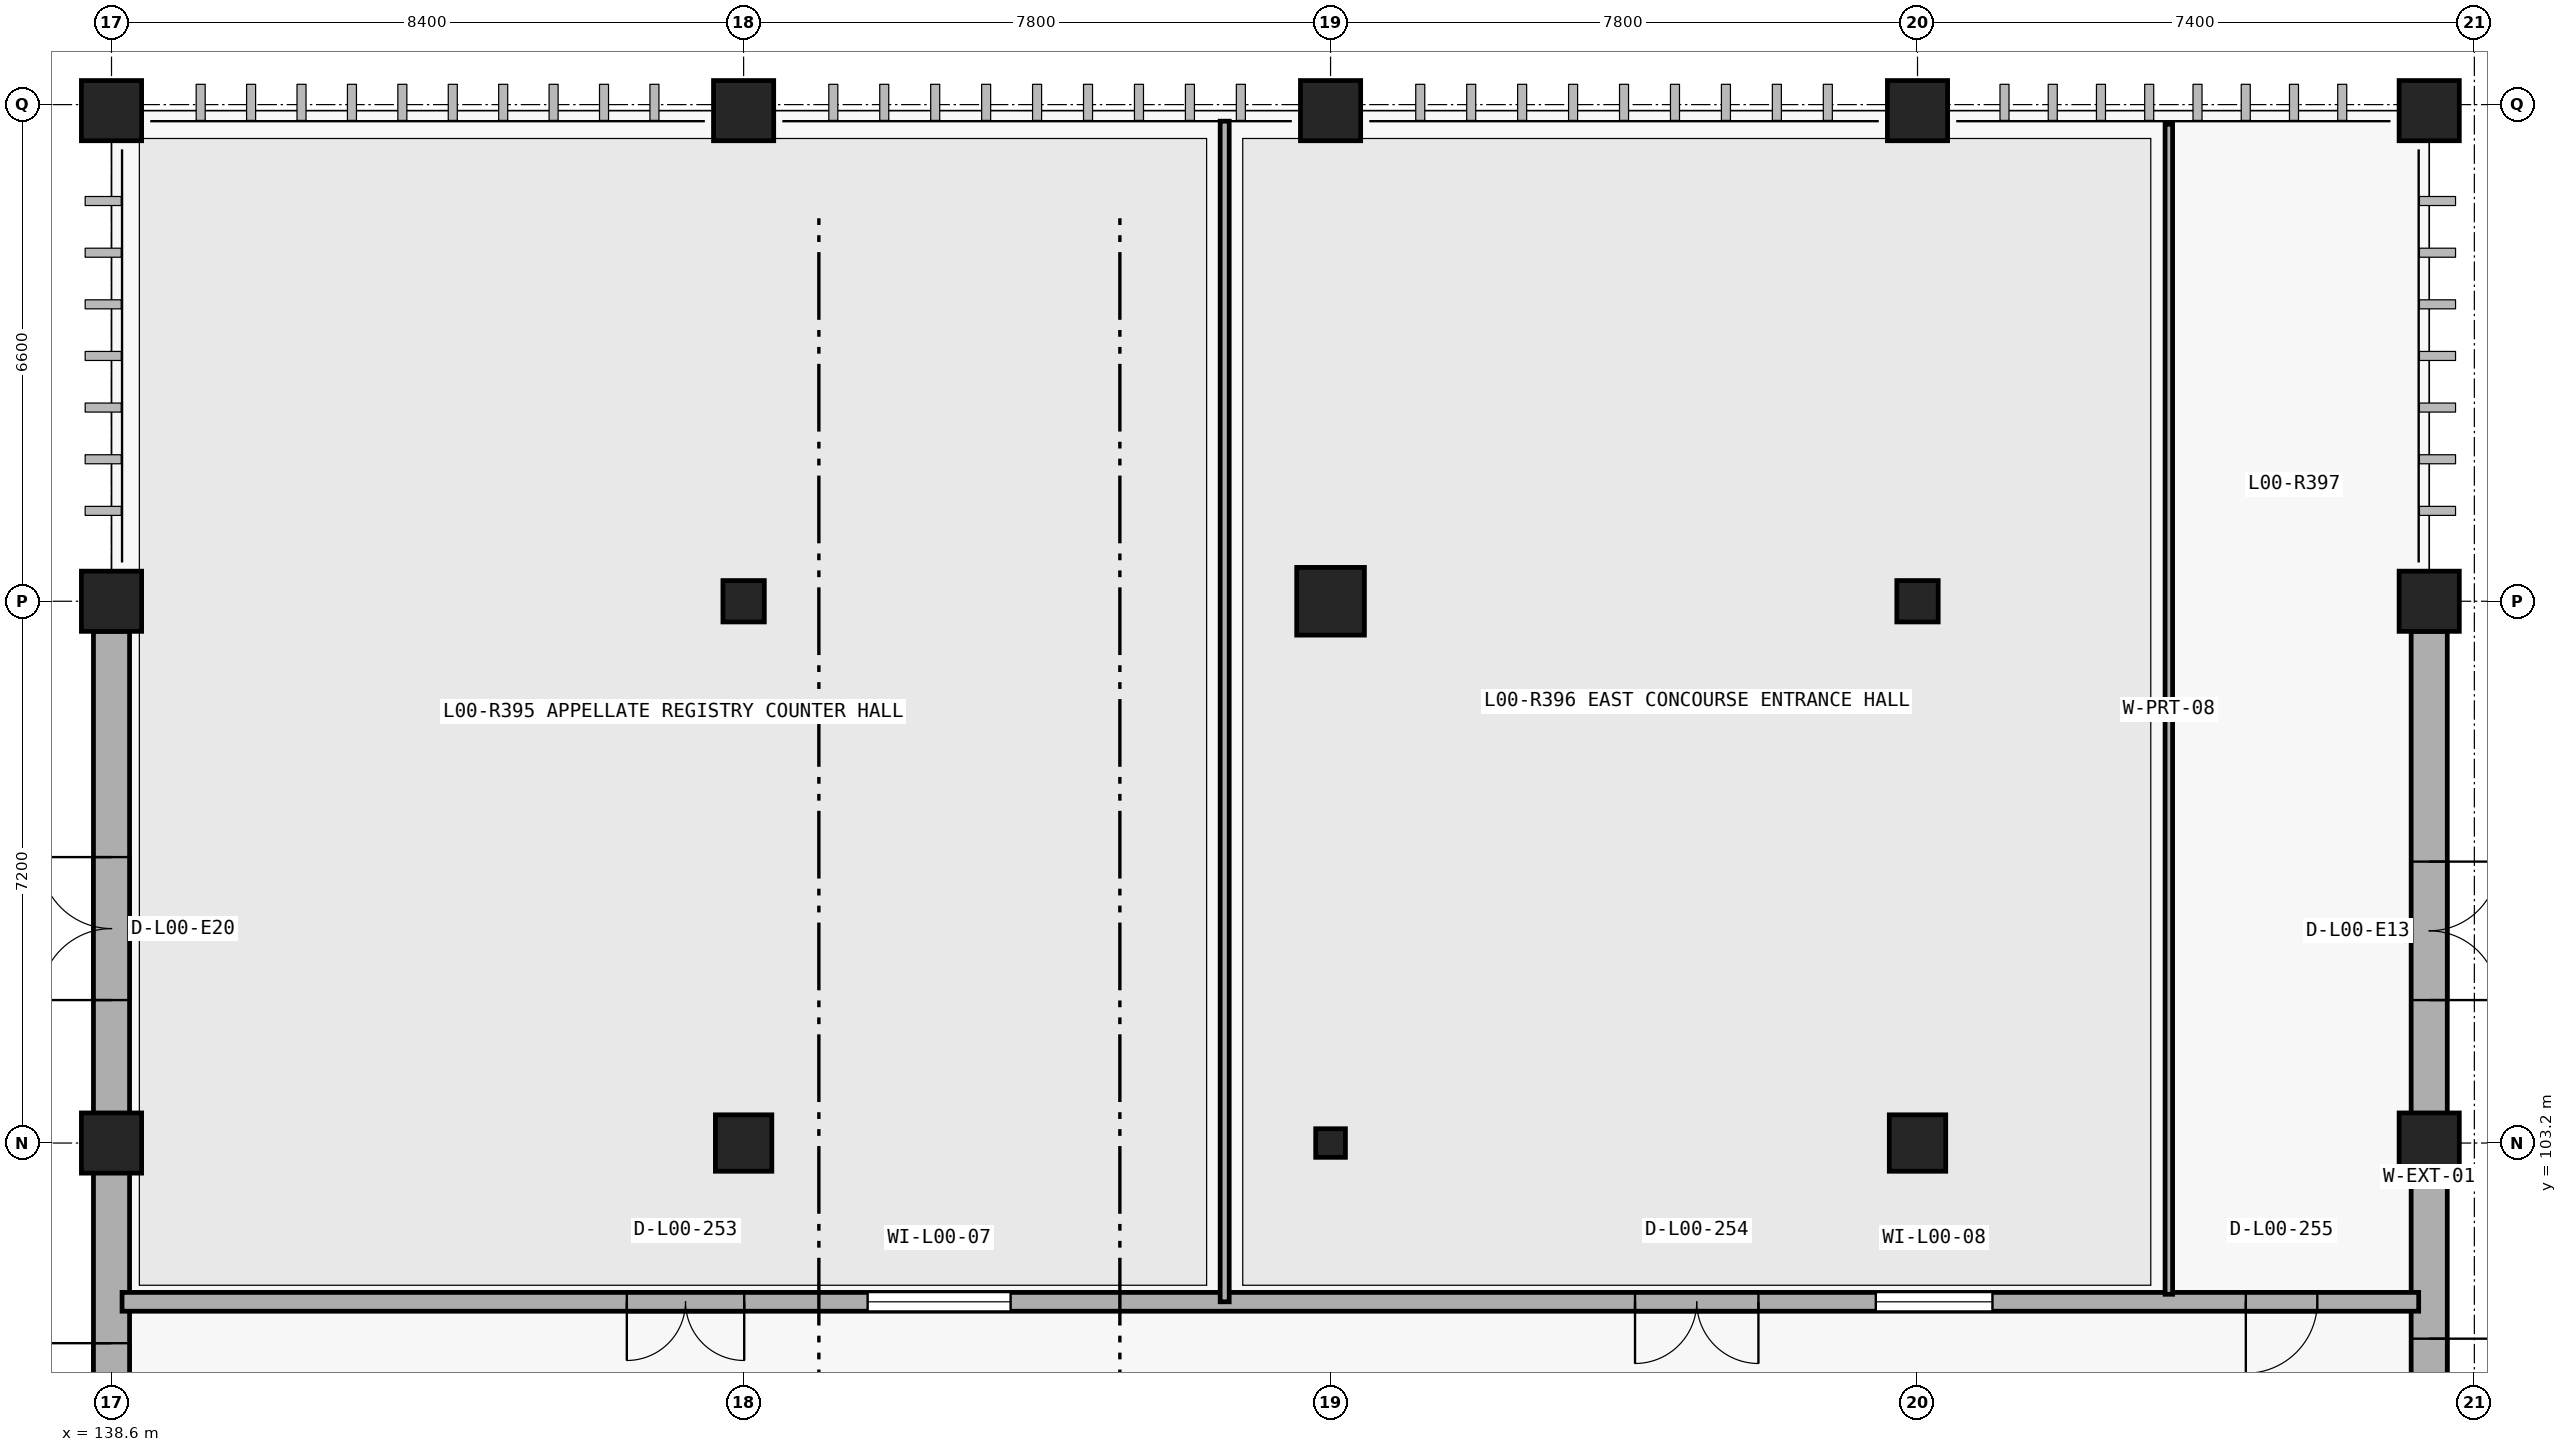
"""IFC4 building model, lengths in metres.
Left out: names, types, materials, properties, quantities, classifications, styles, units other than length and angle.
Written with IfcOpenShell. Run it as: python <this file> out.ifc"""

import sys

from ifc_helpers import new_model, si_unit, direction, frame, frame_2d, origin_with_axes, origin_2d_with_axis, place, context, subcontext, project, spatial, rectangle, circle, i_section, extrude, element, fill, save


model = new_model("IFC4")
c1 = context("Model", 3, precision=1e-05, world=origin_with_axes(), true_north=direction((0.0, 1.0)))
c2 = subcontext(c1, "Body", "Model", "MODEL_VIEW")
j1 = project(units=[si_unit("LENGTHUNIT", "METRE"), si_unit("PLANEANGLEUNIT", "RADIAN")], contexts=[c1])
p1 = place(None, origin_with_axes())
s1 = spatial("IfcSite", under=j1, at=p1, CompositionType="ELEMENT")
p2 = place(p1, origin_with_axes())
s2 = spatial("IfcBuilding", under=s1, at=p2, CompositionType="ELEMENT")
p3 = place(p2, origin_with_axes())
s3 = spatial("IfcBuildingStorey", under=s2, at=p3, CompositionType="ELEMENT", Elevation=0.0)
p4 = place(None, frame((169.4, 95.5, 0.0), z_axis=(0.0, 0.0, 1.0), x_axis=(0.0, 1.0, 0.0)))
e1 = element("IfcWall", 1, at=p4, inside=s3, PredefinedType="SOLIDWALL", context=c2, shape_type="SweptSolid", body=[
    extrude(rectangle(XDim=14.5, YDim=0.48, at=frame_2d((7.25, 0.0), x_axis=(1.0, 0.0))), origin_with_axes(), (0.0, 0.0, 1.0), 4.684),
])
p5 = place(None, frame((169.4, 99.65, 0.0), z_axis=(0.0, 0.0, 1.0), x_axis=(0.0, 1.0, 0.0)))
e2 = element("IfcOpeningElement", 2, at=p5, cuts=e1, PredefinedType="OPENING", context=c2, shape_type="SweptSolid", body=[
    extrude(rectangle(XDim=1.9, YDim=2.4, at=frame_2d((0.0, 1.2), x_axis=(1.0, 0.0))), frame((0.0, 0.25, 0.0), z_axis=(0.0, -1.0, 0.0), x_axis=(1.0, 0.0, 0.0)), (0.0, 0.0, 1.0), 0.5),
])
p6 = place(None, frame((169.4, 106.02, 0.0), z_axis=(0.0, 0.0, 1.0), x_axis=(0.0, 1.0, 0.0)))
e3 = element("IfcOpeningElement", 3, at=p6, cuts=e1, PredefinedType="OPENING", context=c2, shape_type="SweptSolid", body=[
    extrude(rectangle(XDim=1.84, YDim=2.34, at=frame_2d((0.0, 1.17), x_axis=(1.0, 0.0))), frame((0.0, 0.25, 0.0), z_axis=(0.0, -1.0, 0.0), x_axis=(1.0, 0.0, 0.0)), (0.0, 0.0, 1.0), 0.5),
])
p7 = place(None, frame((138.6, 95.5, 0.0), z_axis=(0.0, 0.0, 1.0), x_axis=(0.0, 1.0, 0.0)))
e4 = element("IfcWall", 4, at=p7, inside=s3, PredefinedType="SOLIDWALL", context=c2, shape_type="SweptSolid", body=[
    extrude(rectangle(XDim=14.5, YDim=0.48, at=frame_2d((7.25, 0.0), x_axis=(1.0, 0.0))), origin_with_axes(), (0.0, 0.0, 1.0), 4.684),
])
p8 = place(None, frame((138.6, 99.62, 0.0), z_axis=(0.0, 0.0, 1.0), x_axis=(0.0, 1.0, 0.0)))
e5 = element("IfcOpeningElement", 5, at=p8, cuts=e4, PredefinedType="OPENING", context=c2, shape_type="SweptSolid", body=[
    extrude(rectangle(XDim=1.84, YDim=2.34, at=frame_2d((0.0, 1.17), x_axis=(1.0, 0.0))), frame((0.0, 0.25, 0.0), z_axis=(0.0, -1.0, 0.0), x_axis=(1.0, 0.0, 0.0)), (0.0, 0.0, 1.0), 0.5),
])
p9 = place(None, frame((138.6, 106.05, 0.0), z_axis=(0.0, 0.0, 1.0), x_axis=(0.0, 1.0, 0.0)))
e6 = element("IfcOpeningElement", 6, at=p9, cuts=e4, PredefinedType="OPENING", context=c2, shape_type="SweptSolid", body=[
    extrude(rectangle(XDim=1.9, YDim=2.4, at=frame_2d((0.0, 1.2), x_axis=(1.0, 0.0))), frame((0.0, 0.25, 0.0), z_axis=(0.0, -1.0, 0.0), x_axis=(1.0, 0.0, 0.0)), (0.0, 0.0, 1.0), 0.5),
])
p10 = place(None, frame((138.74, 101.09, 0.0), z_axis=(0.0, 0.0, 1.0), x_axis=(1.0, 0.0, 0.0)))
e7 = element("IfcWall", 7, at=p10, inside=s3, PredefinedType="PARTITIONING", context=c2, shape_type="SweptSolid", body=[
    extrude(rectangle(XDim=30.52, YDim=0.25, at=frame_2d((15.26, 0.0), x_axis=(1.0, 0.0))), origin_with_axes(), (0.0, 0.0, 1.0), 5.08),
])
p11 = place(None, frame((146.228, 101.09, 0.0), z_axis=(0.0, 0.0, 1.0), x_axis=(1.0, 0.0, 0.0)))
e8 = element("IfcOpeningElement", 8, at=p11, cuts=e7, PredefinedType="OPENING", context=c2, shape_type="SweptSolid", body=[
    extrude(rectangle(XDim=1.56, YDim=2.28, at=frame_2d((0.0, 1.14), x_axis=(1.0, 0.0))), frame((0.0, 0.135, 0.0), z_axis=(0.0, -1.0, 0.0), x_axis=(1.0, 0.0, 0.0)), (0.0, 0.0, 1.0), 0.27),
])
p12 = place(None, frame((159.666, 101.09, 0.0), z_axis=(0.0, 0.0, 1.0), x_axis=(1.0, 0.0, 0.0)))
e9 = element("IfcOpeningElement", 9, at=p12, cuts=e7, PredefinedType="OPENING", context=c2, shape_type="SweptSolid", body=[
    extrude(rectangle(XDim=1.64, YDim=2.42, at=frame_2d((0.0, 1.21), x_axis=(1.0, 0.0))), frame((0.0, 0.135, 0.0), z_axis=(0.0, -1.0, 0.0), x_axis=(1.0, 0.0, 0.0)), (0.0, 0.0, 1.0), 0.27),
])
p13 = place(None, frame((167.438, 101.09, 0.0), z_axis=(0.0, 0.0, 1.0), x_axis=(1.0, 0.0, 0.0)))
e10 = element("IfcOpeningElement", 10, at=p13, cuts=e7, PredefinedType="OPENING", context=c2, shape_type="SweptSolid", body=[
    extrude(rectangle(XDim=0.95, YDim=2.1, at=frame_2d((0.0, 1.05), x_axis=(1.0, 0.0))), frame((0.0, 0.135, 0.0), z_axis=(0.0, -1.0, 0.0), x_axis=(1.0, 0.0, 0.0)), (0.0, 0.0, 1.0), 0.27),
])
p14 = place(None, frame((149.598, 101.09, 1.05), z_axis=(0.0, 0.0, 1.0), x_axis=(1.0, 0.0, 0.0)))
e11 = element("IfcOpeningElement", 11, at=p14, cuts=e7, PredefinedType="OPENING", context=c2, shape_type="SweptSolid", body=[
    extrude(rectangle(XDim=1.9, YDim=1.5, at=frame_2d((0.0, 0.75), x_axis=(1.0, 0.0))), frame((0.0, 0.135, 0.0), z_axis=(0.0, -1.0, 0.0), x_axis=(1.0, 0.0, 0.0)), (0.0, 0.0, 1.0), 0.27),
])
p15 = place(None, frame((162.821, 101.09, 1.05), z_axis=(0.0, 0.0, 1.0), x_axis=(1.0, 0.0, 0.0)))
e12 = element("IfcOpeningElement", 12, at=p15, cuts=e7, PredefinedType="OPENING", context=c2, shape_type="SweptSolid", body=[
    extrude(rectangle(XDim=1.55, YDim=1.35, at=frame_2d((0.0, 0.675), x_axis=(1.0, 0.0))), frame((0.0, 0.135, 0.0), z_axis=(0.0, -1.0, 0.0), x_axis=(1.0, 0.0, 0.0)), (0.0, 0.0, 1.0), 0.27),
])
p16 = place(None, frame((165.94, 101.19, 0.0), z_axis=(0.0, 0.0, 1.0), x_axis=(0.0, 1.0, 0.0)))
e13 = element("IfcWall", 13, at=p16, inside=s3, PredefinedType="PARTITIONING", context=c2, shape_type="SweptSolid", body=[
    extrude(rectangle(XDim=15.55, YDim=0.1, at=frame_2d((7.775, 0.0), x_axis=(1.0, 0.0))), origin_with_axes(), (0.0, 0.0, 1.0), 5.08),
])
p17 = place(None, frame((153.393, 101.09, 0.0), z_axis=(0.0, 0.0, 1.0), x_axis=(0.0, 1.0, 0.0)))
e14 = element("IfcWall", 14, at=p17, inside=s3, PredefinedType="PARTITIONING", context=c2, shape_type="SweptSolid", body=[
    extrude(rectangle(XDim=15.69, YDim=0.12, at=frame_2d((7.845, 0.0), x_axis=(1.0, 0.0))), origin_with_axes(), (0.0, 0.0, 1.0), 5.08),
])
for number, where, z_axis, x_axis in (
    (15, (138.6, 103.2, 0.0), (0.0, 0.0, 1.0), (1.0, 0.0, 0.0)),
    (16, (138.6, 110.4, 0.0), (0.0, 0.0, 1.0), (1.0, 0.0, 0.0)),
    (17, (138.6, 116.92, 0.0), (0.0, 0.0, 1.0), (1.0, 0.0, 0.0)),
):
    element("IfcColumn", number, at=place(None, frame(where, z_axis=z_axis, x_axis=x_axis)), inside=s3, PredefinedType="COLUMN", context=c2, shape_type="SweptSolid", body=[
        extrude(circle(Radius=0.4, at=origin_2d_with_axis()), origin_with_axes(), (0.0, 0.0, 1.0), 5.4),
    ])
p18 = place(None, frame((147.0, 103.2, 0.0), z_axis=(0.0, 0.0, 1.0), x_axis=(1.0, 0.0, 0.0)))
e18 = element("IfcColumn", 18, at=p18, inside=s3, PredefinedType="COLUMN", context=c2, shape_type="SweptSolid", body=[
    extrude(rectangle(XDim=0.75, YDim=0.75, at=origin_2d_with_axis()), origin_with_axes(), (0.0, 0.0, 1.0), 5.4),
])
p19 = place(None, frame((147.0, 110.4, 0.0), z_axis=(0.0, 0.0, 1.0), x_axis=(1.0, 0.0, 0.0)))
e19 = element("IfcColumn", 19, at=p19, inside=s3, PredefinedType="COLUMN", context=c2, shape_type="SweptSolid", body=[
    extrude(i_section(OverallWidth=0.55, OverallDepth=0.55, WebThickness=0.025, FlangeThickness=0.042, at=origin_2d_with_axis()), origin_with_axes(), (0.0, 0.0, 1.0), 5.4),
])
p20 = place(None, frame((147.0, 116.92, 0.0), z_axis=(0.0, 0.0, 1.0), x_axis=(1.0, 0.0, 0.0)))
e20 = element("IfcColumn", 20, at=p20, inside=s3, PredefinedType="COLUMN", context=c2, shape_type="SweptSolid", body=[
    extrude(circle(Radius=0.4, at=origin_2d_with_axis()), origin_with_axes(), (0.0, 0.0, 1.0), 5.4),
])
p21 = place(None, frame((154.8, 103.2, 0.0), z_axis=(0.0, 0.0, 1.0), x_axis=(1.0, 0.0, 0.0)))
e21 = element("IfcColumn", 21, at=p21, inside=s3, PredefinedType="COLUMN", context=c2, shape_type="SweptSolid", body=[
    extrude(i_section(OverallWidth=0.395, OverallDepth=0.38, WebThickness=0.019, FlangeThickness=0.03, at=origin_2d_with_axis()), origin_with_axes(), (0.0, 0.0, 1.0), 5.4),
])
p22 = place(None, frame((154.8, 110.4, 0.0), z_axis=(0.0, 0.0, 1.0), x_axis=(1.0, 0.0, 0.0)))
e22 = element("IfcColumn", 22, at=p22, inside=s3, PredefinedType="COLUMN", context=c2, shape_type="SweptSolid", body=[
    extrude(rectangle(XDim=0.9, YDim=0.9, at=origin_2d_with_axis()), origin_with_axes(), (0.0, 0.0, 1.0), 5.4),
])
p23 = place(None, frame((154.8, 116.92, 0.0), z_axis=(0.0, 0.0, 1.0), x_axis=(1.0, 0.0, 0.0)))
e23 = element("IfcColumn", 23, at=p23, inside=s3, PredefinedType="COLUMN", context=c2, shape_type="SweptSolid", body=[
    extrude(circle(Radius=0.4, at=origin_2d_with_axis()), origin_with_axes(), (0.0, 0.0, 1.0), 5.4),
])
p24 = place(None, frame((162.6, 103.2, 0.0), z_axis=(0.0, 0.0, 1.0), x_axis=(1.0, 0.0, 0.0)))
e24 = element("IfcColumn", 24, at=p24, inside=s3, PredefinedType="COLUMN", context=c2, shape_type="SweptSolid", body=[
    extrude(rectangle(XDim=0.75, YDim=0.75, at=origin_2d_with_axis()), origin_with_axes(), (0.0, 0.0, 1.0), 5.4),
])
p25 = place(None, frame((162.6, 110.4, 0.0), z_axis=(0.0, 0.0, 1.0), x_axis=(1.0, 0.0, 0.0)))
e25 = element("IfcColumn", 25, at=p25, inside=s3, PredefinedType="COLUMN", context=c2, shape_type="SweptSolid", body=[
    extrude(i_section(OverallWidth=0.55, OverallDepth=0.55, WebThickness=0.025, FlangeThickness=0.042, at=origin_2d_with_axis()), origin_with_axes(), (0.0, 0.0, 1.0), 5.4),
])
for number, where, z_axis, x_axis in (
    (26, (162.6, 116.92, 0.0), (0.0, 0.0, 1.0), (1.0, 0.0, 0.0)),
    (27, (169.4, 103.2, 0.0), (0.0, 0.0, 1.0), (1.0, 0.0, 0.0)),
    (28, (169.4, 110.4, 0.0), (0.0, 0.0, 1.0), (1.0, 0.0, 0.0)),
    (29, (169.4, 116.92, 0.0), (0.0, 0.0, 1.0), (1.0, 0.0, 0.0)),
):
    element("IfcColumn", number, at=place(None, frame(where, z_axis=z_axis, x_axis=x_axis)), inside=s3, PredefinedType="COLUMN", context=c2, shape_type="SweptSolid", body=[
        extrude(circle(Radius=0.4, at=origin_2d_with_axis()), origin_with_axes(), (0.0, 0.0, 1.0), 5.4),
    ])
p26 = place(None, frame((169.4, 99.65, 0.0), z_axis=(0.0, 0.0, 1.0), x_axis=(0.0, -1.0, 0.0)))
e30 = element("IfcDoor", 30, at=p26, inside=s3, OperationType="DOUBLE_DOOR_SINGLE_SWING", PredefinedType="DOOR", context=c2, shape_type="SweptSolid", body=[
    extrude(rectangle(XDim=1.9, YDim=2.4, at=frame_2d((0.0, 1.2), x_axis=(1.0, 0.0))), frame((0.0, 0.04, 0.0), z_axis=(0.0, -1.0, 0.0), x_axis=(1.0, 0.0, 0.0)), (0.0, 0.0, 1.0), 0.08),
])
fill(e2, e30)
p27 = place(None, frame((169.4, 106.02, 0.0), z_axis=(0.0, 0.0, 1.0), x_axis=(0.0, -1.0, 0.0)))
e31 = element("IfcDoor", 31, at=p27, inside=s3, OperationType="DOUBLE_DOOR_SINGLE_SWING", PredefinedType="DOOR", context=c2, shape_type="SweptSolid", body=[
    extrude(rectangle(XDim=1.84, YDim=2.34, at=frame_2d((0.0, 1.17), x_axis=(1.0, 0.0))), frame((0.0, 0.04, 0.0), z_axis=(0.0, -1.0, 0.0), x_axis=(1.0, 0.0, 0.0)), (0.0, 0.0, 1.0), 0.08),
])
fill(e3, e31)
p28 = place(None, frame((138.6, 99.62, 0.0), z_axis=(0.0, 0.0, 1.0), x_axis=(0.0, 1.0, 0.0)))
e32 = element("IfcDoor", 32, at=p28, inside=s3, OperationType="DOUBLE_DOOR_SINGLE_SWING", PredefinedType="DOOR", context=c2, shape_type="SweptSolid", body=[
    extrude(rectangle(XDim=1.84, YDim=2.34, at=frame_2d((0.0, 1.17), x_axis=(1.0, 0.0))), frame((0.0, 0.04, 0.0), z_axis=(0.0, -1.0, 0.0), x_axis=(1.0, 0.0, 0.0)), (0.0, 0.0, 1.0), 0.08),
])
fill(e5, e32)
p29 = place(None, frame((138.6, 106.05, 0.0), z_axis=(0.0, 0.0, 1.0), x_axis=(0.0, 1.0, 0.0)))
e33 = element("IfcDoor", 33, at=p29, inside=s3, OperationType="DOUBLE_DOOR_SINGLE_SWING", PredefinedType="DOOR", context=c2, shape_type="SweptSolid", body=[
    extrude(rectangle(XDim=1.9, YDim=2.4, at=frame_2d((0.0, 1.2), x_axis=(1.0, 0.0))), frame((0.0, 0.04, 0.0), z_axis=(0.0, -1.0, 0.0), x_axis=(1.0, 0.0, 0.0)), (0.0, 0.0, 1.0), 0.08),
])
fill(e6, e33)
p30 = place(None, frame((146.228, 101.09, 0.0), z_axis=(0.0, 0.0, 1.0), x_axis=(-1.0, 0.0, 0.0)))
e34 = element("IfcDoor", 34, at=p30, inside=s3, OperationType="DOUBLE_DOOR_SINGLE_SWING", PredefinedType="DOOR", context=c2, shape_type="SweptSolid", body=[
    extrude(rectangle(XDim=1.56, YDim=2.28, at=frame_2d((0.0, 1.14), x_axis=(1.0, 0.0))), frame((0.0, 0.04, 0.0), z_axis=(0.0, -1.0, 0.0), x_axis=(1.0, 0.0, 0.0)), (0.0, 0.0, 1.0), 0.08),
])
fill(e8, e34)
p31 = place(None, frame((159.666, 101.09, 0.0), z_axis=(0.0, 0.0, 1.0), x_axis=(-1.0, 0.0, 0.0)))
e35 = element("IfcDoor", 35, at=p31, inside=s3, OperationType="DOUBLE_DOOR_SINGLE_SWING", PredefinedType="DOOR", context=c2, shape_type="SweptSolid", body=[
    extrude(rectangle(XDim=1.64, YDim=2.42, at=frame_2d((0.0, 1.21), x_axis=(1.0, 0.0))), frame((0.0, 0.04, 0.0), z_axis=(0.0, -1.0, 0.0), x_axis=(1.0, 0.0, 0.0)), (0.0, 0.0, 1.0), 0.08),
])
fill(e9, e35)
p32 = place(None, frame((167.438, 101.09, 0.0), z_axis=(0.0, 0.0, 1.0), x_axis=(-1.0, 0.0, 0.0)))
e36 = element("IfcDoor", 36, at=p32, inside=s3, OperationType="SINGLE_SWING_LEFT", PredefinedType="DOOR", context=c2, shape_type="SweptSolid", body=[
    extrude(rectangle(XDim=0.95, YDim=2.1, at=frame_2d((0.0, 1.05), x_axis=(1.0, 0.0))), frame((0.0, 0.04, 0.0), z_axis=(0.0, -1.0, 0.0), x_axis=(1.0, 0.0, 0.0)), (0.0, 0.0, 1.0), 0.08),
])
fill(e10, e36)
p33 = place(None, frame((149.598, 101.09, 1.05), z_axis=(0.0, 0.0, 1.0), x_axis=(1.0, 0.0, 0.0)))
e37 = element("IfcWindow", 37, at=p33, inside=s3, PartitioningType="SINGLE_PANEL", PredefinedType="WINDOW", context=c2, shape_type="SweptSolid", body=[
    extrude(rectangle(XDim=1.9, YDim=1.5, at=frame_2d((0.0, 0.75), x_axis=(1.0, 0.0))), frame((0.0, 0.03, 0.0), z_axis=(0.0, -1.0, 0.0), x_axis=(1.0, 0.0, 0.0)), (0.0, 0.0, 1.0), 0.06),
])
fill(e11, e37)
p34 = place(None, frame((162.821, 101.09, 1.05), z_axis=(0.0, 0.0, 1.0), x_axis=(1.0, 0.0, 0.0)))
e38 = element("IfcWindow", 38, at=p34, inside=s3, PartitioningType="SINGLE_PANEL", PredefinedType="WINDOW", context=c2, shape_type="SweptSolid", body=[
    extrude(rectangle(XDim=1.55, YDim=1.35, at=frame_2d((0.0, 0.675), x_axis=(1.0, 0.0))), frame((0.0, 0.03, 0.0), z_axis=(0.0, -1.0, 0.0), x_axis=(1.0, 0.0, 0.0)), (0.0, 0.0, 1.0), 0.06),
])
fill(e12, e38)
save(model, sys.argv[1])
